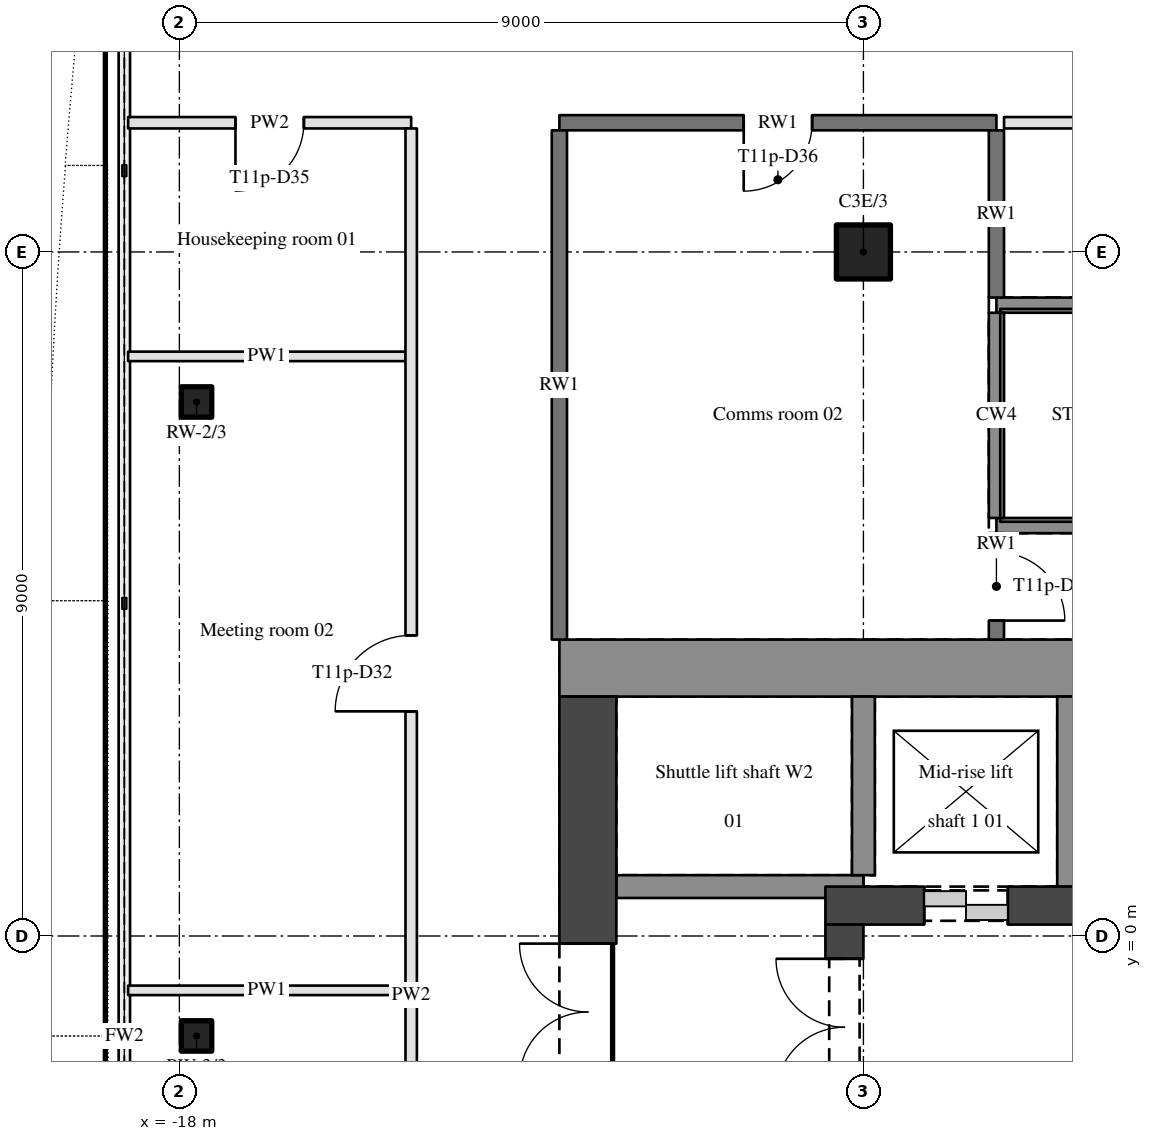
"""IFC4 building model, lengths in metres.
Left out: names, types, materials, properties, quantities, classifications, styles, units other than length and angle.
Written with IfcOpenShell. Run it as: python <this file> out.ifc"""

import sys

from ifc_helpers import new_model, si_unit, direction, frame, frame_2d, origin, origin_2d, place, context, subcontext, project, spatial, rectangle, hollow_rectangle, hollow_circle, extrude, element, fill, save


model = new_model("IFC4")
c1 = context("Model", 3, precision=1e-05, world=origin(), true_north=direction((0.0, 1.0)))
c2 = subcontext(c1, "Body", "Model", "MODEL_VIEW")
j1 = project(units=[si_unit("LENGTHUNIT", "METRE"), si_unit("PLANEANGLEUNIT", "RADIAN")], contexts=[c1])
p1 = place(None, origin())
s1 = spatial("IfcSite", under=j1, at=p1, CompositionType="ELEMENT")
p2 = place(p1, origin())
s2 = spatial("IfcBuilding", under=s1, at=p2, CompositionType="ELEMENT")
p3 = place(p2, frame((0.0, 0.0, 158.9)))
s3 = spatial("IfcBuildingStorey", under=s2, at=p3, CompositionType="ELEMENT", Elevation=158.9)
p4 = place(p3, frame((-9.0, 9.0, 0.0), z_axis=(0.0, 0.0, 1.0), x_axis=(1.0, 0.0, 0.0)))
e1 = element("IfcColumn", 1, at=p4, inside=s3, PredefinedType="COLUMN", context=c2, shape_type="SweptSolid", body=[
    extrude(hollow_circle(Radius=0.355, WallThickness=0.032, at=origin_2d()), origin(), (0.0, 0.0, 1.0), 3.4),
])
for number, where, z_axis, x_axis in (
    (2, (-17.774, 7.026, 0.0), (0.0, 0.0, 1.0), (1.0, 0.0, 0.0)),
    (3, (-17.774, -1.315, 0.0), (0.0, 0.0, 1.0), (1.0, 0.0, 0.0)),
):
    element("IfcColumn", number, at=place(p3, frame(where, z_axis=z_axis, x_axis=x_axis)), inside=s3, PredefinedType="COLUMN", context=c2, shape_type="SweptSolid", body=[
        extrude(hollow_rectangle(XDim=0.4, YDim=0.4, WallThickness=0.02, InnerFilletRadius=0.03, OuterFilletRadius=0.05, at=origin_2d()), origin(), (0.0, 0.0, 1.0), 3.4),
    ])
p5 = place(p3, frame((-13.0, 3.525, 0.0), z_axis=(0.0, 0.0, 1.0), x_axis=(1.0, 0.0, 0.0)))
e4 = element("IfcWall", 4, at=p5, inside=s3, PredefinedType="SHEAR", context=c2, shape_type="SweptSolid", body=[
    extrude(rectangle(XDim=26.0, YDim=0.75, at=frame_2d((13.0, 0.0))), origin(), (0.0, 0.0, 1.0), 3.4),
])
p6 = place(p3, frame((-12.625, -11.5, 0.0), z_axis=(0.0, 0.0, 1.0), x_axis=(0.0, 1.0, 0.0)))
e5 = element("IfcWall", 5, at=p6, inside=s3, PredefinedType="SHEAR", context=c2, shape_type="SweptSolid", body=[
    extrude(rectangle(XDim=14.65, YDim=0.75, at=frame_2d((7.325, 0.0))), origin(), (0.0, 0.0, 1.0), 3.4),
])
p7 = place(p6, frame((9.6, 0.0, 0.0)))
e6 = element("IfcOpeningElement", 6, at=p7, cuts=e5, PredefinedType="OPENING", context=c2, shape_type="SweptSolid", body=[
    extrude(rectangle(XDim=1.8, YDim=2.1, at=frame_2d((0.9, 1.05))), frame((0.0, 0.385, 0.0), z_axis=(0.0, -1.0, 0.0), x_axis=(1.0, 0.0, 0.0)), (0.0, 0.0, 1.0), 0.77),
])
p8 = place(p3, frame((-9.5, 0.4, 0.0), z_axis=(0.0, 0.0, 1.0), x_axis=(1.0, 0.0, 0.0)))
e7 = element("IfcWall", 7, at=p8, inside=s3, PredefinedType="SHEAR", context=c2, shape_type="SweptSolid", body=[
    extrude(rectangle(XDim=19.0, YDim=0.5, at=frame_2d((9.5, 0.0))), origin(), (0.0, 0.0, 1.0), 3.4),
])
p9 = place(p8, frame((1.3, 0.0, 0.0)))
e8 = element("IfcOpeningElement", 8, at=p9, cuts=e7, PredefinedType="OPENING", context=c2, shape_type="SweptSolid", body=[
    extrude(rectangle(XDim=1.1, YDim=2.1, at=frame_2d((0.55, 1.05))), frame((0.0, 0.26, 0.0), z_axis=(0.0, -1.0, 0.0), x_axis=(1.0, 0.0, 0.0)), (0.0, 0.0, 1.0), 0.52),
])
p10 = place(p8, frame((4.0, 0.0, 0.0)))
e9 = element("IfcOpeningElement", 9, at=p10, cuts=e7, PredefinedType="OPENING", context=c2, shape_type="SweptSolid", body=[
    extrude(rectangle(XDim=1.1, YDim=2.1, at=frame_2d((0.55, 1.05))), frame((0.0, 0.26, 0.0), z_axis=(0.0, -1.0, 0.0), x_axis=(1.0, 0.0, 0.0)), (0.0, 0.0, 1.0), 0.52),
])
p11 = place(p8, frame((6.7, 0.0, 0.0)))
e10 = element("IfcOpeningElement", 10, at=p11, cuts=e7, PredefinedType="OPENING", context=c2, shape_type="SweptSolid", body=[
    extrude(rectangle(XDim=1.1, YDim=2.1, at=frame_2d((0.55, 1.05))), frame((0.0, 0.26, 0.0), z_axis=(0.0, -1.0, 0.0), x_axis=(1.0, 0.0, 0.0)), (0.0, 0.0, 1.0), 0.52),
])
p12 = place(p8, frame((11.2, 0.0, 0.0)))
e11 = element("IfcOpeningElement", 11, at=p12, cuts=e7, PredefinedType="OPENING", context=c2, shape_type="SweptSolid", body=[
    extrude(rectangle(XDim=1.1, YDim=2.1, at=frame_2d((0.55, 1.05))), frame((0.0, 0.26, 0.0), z_axis=(0.0, -1.0, 0.0), x_axis=(1.0, 0.0, 0.0)), (0.0, 0.0, 1.0), 0.52),
])
p13 = place(p8, frame((13.9, 0.0, 0.0)))
e12 = element("IfcOpeningElement", 12, at=p13, cuts=e7, PredefinedType="OPENING", context=c2, shape_type="SweptSolid", body=[
    extrude(rectangle(XDim=1.1, YDim=2.1, at=frame_2d((0.55, 1.05))), frame((0.0, 0.26, 0.0), z_axis=(0.0, -1.0, 0.0), x_axis=(1.0, 0.0, 0.0)), (0.0, 0.0, 1.0), 0.52),
])
p14 = place(p8, frame((16.6, 0.0, 0.0)))
e13 = element("IfcOpeningElement", 13, at=p14, cuts=e7, PredefinedType="OPENING", context=c2, shape_type="SweptSolid", body=[
    extrude(rectangle(XDim=1.1, YDim=2.1, at=frame_2d((0.55, 1.05))), frame((0.0, 0.26, 0.0), z_axis=(0.0, -1.0, 0.0), x_axis=(1.0, 0.0, 0.0)), (0.0, 0.0, 1.0), 0.52),
])
p15 = place(p3, frame((-9.25, -11.5, 0.0), z_axis=(0.0, 0.0, 1.0), x_axis=(0.0, 1.0, 0.0)))
e14 = element("IfcWall", 14, at=p15, inside=s3, PredefinedType="SHEAR", context=c2, shape_type="SweptSolid", body=[
    extrude(rectangle(XDim=11.65, YDim=0.5, at=frame_2d((5.825, 0.0))), origin(), (0.0, 0.0, 1.0), 3.4),
])
p16 = place(p15, frame((9.4, 0.0, 0.0)))
e15 = element("IfcOpeningElement", 15, at=p16, cuts=e14, PredefinedType="OPENING", context=c2, shape_type="SweptSolid", body=[
    extrude(rectangle(XDim=1.8, YDim=2.1, at=frame_2d((0.9, 1.05))), frame((0.0, 0.26, 0.0), z_axis=(0.0, -1.0, 0.0), x_axis=(1.0, 0.0, 0.0)), (0.0, 0.0, 1.0), 0.52),
])
p17 = place(p15, frame((5.25, 0.0, 0.0)))
e16 = element("IfcOpeningElement", 16, at=p17, cuts=e14, PredefinedType="OPENING", context=c2, shape_type="SweptSolid", body=[
    extrude(rectangle(XDim=1.1, YDim=2.1, at=frame_2d((0.55, 1.05))), frame((0.0, 0.26, 0.0), z_axis=(0.0, -1.0, 0.0), x_axis=(1.0, 0.0, 0.0)), (0.0, 0.0, 1.0), 0.52),
])
p18 = place(p3, frame((-18.674, -0.715, 0.0), z_axis=(0.0, 0.0, 1.0), x_axis=(1.0, 0.0, 0.0)))
e17 = element("IfcWall", 17, at=p18, inside=s3, PredefinedType="PARTITIONING", context=c2, shape_type="SweptSolid", body=[
    extrude(rectangle(XDim=3.649, YDim=0.125, at=frame_2d((1.825, 0.0))), origin(), (0.0, 0.0, 1.0), 2.46),
])
p19 = place(p3, frame((-9.0, 0.65, 0.0), z_axis=(0.0, 0.0, 1.0), x_axis=(-1.0, 0.0, 0.0)))
e18 = element("IfcWall", 18, at=p19, inside=s3, PredefinedType="SHEAR", context=c2, shape_type="SweptSolid", body=[
    extrude(rectangle(XDim=3.25, YDim=0.3, at=frame_2d((1.625, 0.0))), origin(), (0.0, 0.0, 1.0), 3.4),
])
p20 = place(p3, frame((-7.25, 5.4, 0.0), z_axis=(0.0, 0.0, 1.0), x_axis=(1.0, 0.0, 0.0)))
e19 = element("IfcWall", 19, at=p20, inside=s3, PredefinedType="SHEAR", context=c2, shape_type="SweptSolid", body=[
    extrude(rectangle(XDim=6.6, YDim=0.2, at=frame_2d((3.3, 0.0))), origin(), (0.0, 0.0, 1.0), 3.4),
])
p21 = place(p3, frame((-18.674, 7.626, 0.0), z_axis=(0.0, 0.0, 1.0), x_axis=(1.0, 0.0, 0.0)))
e20 = element("IfcWall", 20, at=p21, inside=s3, PredefinedType="PARTITIONING", context=c2, shape_type="SweptSolid", body=[
    extrude(rectangle(XDim=3.649, YDim=0.125, at=frame_2d((1.825, 0.0))), origin(), (0.0, 0.0, 1.0), 2.46),
])
p22 = place(p3, frame((-0.65, 8.3, 0.0), z_axis=(0.0, 0.0, 1.0), x_axis=(-1.0, 0.0, 0.0)))
e21 = element("IfcWall", 21, at=p22, inside=s3, PredefinedType="SHEAR", context=c2, shape_type="SweptSolid", body=[
    extrude(rectangle(XDim=6.6, YDim=0.2, at=frame_2d((3.3, 0.0))), origin(), (0.0, 0.0, 1.0), 3.4),
])
p23 = place(p22, frame((0.2, 0.0, 0.0)))
e22 = element("IfcOpeningElement", 22, at=p23, cuts=e21, PredefinedType="OPENING", context=c2, shape_type="SweptSolid", body=[
    extrude(rectangle(XDim=1.1, YDim=2.1, at=frame_2d((0.55, 1.05))), frame((0.0, 0.11, 0.0), z_axis=(0.0, -1.0, 0.0), x_axis=(1.0, 0.0, 0.0)), (0.0, 0.0, 1.0), 0.22),
])
p24 = place(p3, frame((-14.95, 10.7, 0.0), z_axis=(0.0, 0.0, 1.0), x_axis=(-1.0, 0.0, 0.0)))
e23 = element("IfcWall", 23, at=p24, inside=s3, PredefinedType="PARTITIONING", context=c2, shape_type="SweptSolid", body=[
    extrude(rectangle(XDim=3.724, YDim=0.15, at=frame_2d((1.862, 0.0))), origin(), (0.0, 0.0, 1.0), 2.46),
])
p25 = place(p24, frame((1.412, 0.0, 0.0)))
e24 = element("IfcOpeningElement", 24, at=p25, cuts=e23, PredefinedType="OPENING", context=c2, shape_type="SweptSolid", body=[
    extrude(rectangle(XDim=0.9, YDim=2.1, at=frame_2d((0.45, 1.05))), frame((0.0, 0.085, 0.0), z_axis=(0.0, -1.0, 0.0), x_axis=(1.0, 0.0, 0.0)), (0.0, 0.0, 1.0), 0.17),
])
p26 = place(p3, frame((-7.25, 10.7, 0.0), z_axis=(0.0, 0.0, 1.0), x_axis=(-1.0, 0.0, 0.0)))
e25 = element("IfcWall", 25, at=p26, inside=s3, PredefinedType="SOLIDWALL", context=c2, shape_type="SweptSolid", body=[
    extrude(rectangle(XDim=5.75, YDim=0.2, at=frame_2d((2.875, 0.0))), origin(), (0.0, 0.0, 1.0), 2.46),
])
p27 = place(p26, frame((2.425, 0.0, 0.0)))
e26 = element("IfcOpeningElement", 26, at=p27, cuts=e25, PredefinedType="OPENING", context=c2, shape_type="SweptSolid", body=[
    extrude(rectangle(XDim=0.9, YDim=2.1, at=frame_2d((0.45, 1.05))), frame((0.0, 0.11, 0.0), z_axis=(0.0, -1.0, 0.0), x_axis=(1.0, 0.0, 0.0)), (0.0, 0.0, 1.0), 0.22),
])
p28 = place(p3, frame((16.05, 10.7, 0.0), z_axis=(0.0, 0.0, 1.0), x_axis=(-1.0, 0.0, 0.0)))
e27 = element("IfcWall", 27, at=p28, inside=s3, PredefinedType="PARTITIONING", context=c2, shape_type="SweptSolid", body=[
    extrude(rectangle(XDim=23.2, YDim=0.15, at=frame_2d((11.6, 0.0))), origin(), (0.0, 0.0, 1.0), 2.46),
])
p29 = place(p28, frame((19.125, 0.0, 0.0)))
e28 = element("IfcOpeningElement", 28, at=p29, cuts=e27, PredefinedType="OPENING", context=c2, shape_type="SweptSolid", body=[
    extrude(rectangle(XDim=1.0, YDim=2.1, at=frame_2d((0.5, 1.05))), frame((0.0, 0.085, 0.0), z_axis=(0.0, -1.0, 0.0), x_axis=(1.0, 0.0, 0.0)), (0.0, 0.0, 1.0), 0.17),
])
p30 = place(p28, frame((10.35, 0.0, 0.0)))
e29 = element("IfcOpeningElement", 29, at=p30, cuts=e27, PredefinedType="OPENING", context=c2, shape_type="SweptSolid", body=[
    extrude(rectangle(XDim=0.9, YDim=2.1, at=frame_2d((0.45, 1.05))), frame((0.0, 0.085, 0.0), z_axis=(0.0, -1.0, 0.0), x_axis=(1.0, 0.0, 0.0)), (0.0, 0.0, 1.0), 0.17),
])
p31 = place(p28, frame((3.85, 0.0, 0.0)))
e30 = element("IfcOpeningElement", 30, at=p31, cuts=e27, PredefinedType="OPENING", context=c2, shape_type="SweptSolid", body=[
    extrude(rectangle(XDim=0.9, YDim=2.1, at=frame_2d((0.45, 1.05))), frame((0.0, 0.085, 0.0), z_axis=(0.0, -1.0, 0.0), x_axis=(1.0, 0.0, 0.0)), (0.0, 0.0, 1.0), 0.17),
])
p32 = place(p28, frame((1.075, 0.0, 0.0)))
e31 = element("IfcOpeningElement", 31, at=p32, cuts=e27, PredefinedType="OPENING", context=c2, shape_type="SweptSolid", body=[
    extrude(rectangle(XDim=0.9, YDim=2.1, at=frame_2d((0.45, 1.05))), frame((0.0, 0.085, 0.0), z_axis=(0.0, -1.0, 0.0), x_axis=(1.0, 0.0, 0.0)), (0.0, 0.0, 1.0), 0.17),
])
p33 = place(p3, frame((-14.95, -12.175, 0.0), z_axis=(0.0, 0.0, 1.0), x_axis=(0.0, 1.0, 0.0)))
e32 = element("IfcWall", 32, at=p33, inside=s3, PredefinedType="PARTITIONING", context=c2, shape_type="SweptSolid", body=[
    extrude(rectangle(XDim=22.8, YDim=0.15, at=frame_2d((11.4, 0.0))), origin(), (0.0, 0.0, 1.0), 2.46),
])
p34 = place(p33, frame((6.789, 0.0, 0.0)))
e33 = element("IfcOpeningElement", 33, at=p34, cuts=e32, PredefinedType="OPENING", context=c2, shape_type="SweptSolid", body=[
    extrude(rectangle(XDim=1.0, YDim=2.1, at=frame_2d((0.5, 1.05))), frame((0.0, 0.085, 0.0), z_axis=(0.0, -1.0, 0.0), x_axis=(1.0, 0.0, 0.0)), (0.0, 0.0, 1.0), 0.17),
])
p35 = place(p33, frame((15.131, 0.0, 0.0)))
e34 = element("IfcOpeningElement", 34, at=p35, cuts=e32, PredefinedType="OPENING", context=c2, shape_type="SweptSolid", body=[
    extrude(rectangle(XDim=1.0, YDim=2.1, at=frame_2d((0.5, 1.05))), frame((0.0, 0.085, 0.0), z_axis=(0.0, -1.0, 0.0), x_axis=(1.0, 0.0, 0.0)), (0.0, 0.0, 1.0), 0.17),
])
p36 = place(p3, frame((-13.0, 3.9, 0.0), z_axis=(0.0, 0.0, 1.0), x_axis=(0.0, 1.0, 0.0)))
e35 = element("IfcWall", 35, at=p36, inside=s3, PredefinedType="SOLIDWALL", context=c2, shape_type="SweptSolid", body=[
    extrude(rectangle(XDim=6.7, YDim=0.2, at=frame_2d((3.35, 0.0))), origin(), (0.0, 0.0, 1.0), 2.46),
])
p37 = place(p3, frame((-9.0, 0.8, 0.0), z_axis=(0.0, 0.0, 1.0), x_axis=(0.0, 1.0, 0.0)))
e36 = element("IfcWall", 36, at=p37, inside=s3, PredefinedType="SHEAR", context=c2, shape_type="SweptSolid", body=[
    extrude(rectangle(XDim=2.35, YDim=0.3, at=frame_2d((1.175, 0.0))), origin(), (0.0, 0.0, 1.0), 3.4),
])
p38 = place(p3, frame((-7.25, 5.3, 0.0), z_axis=(0.0, 0.0, 1.0), x_axis=(0.0, -1.0, 0.0)))
e37 = element("IfcWall", 37, at=p38, inside=s3, PredefinedType="SOLIDWALL", context=c2, shape_type="SweptSolid", body=[
    extrude(rectangle(XDim=1.4, YDim=0.2, at=frame_2d((0.7, 0.0))), origin(), (0.0, 0.0, 1.0), 2.46),
])
p39 = place(p38, frame((0.25, 0.0, 0.0)))
e38 = element("IfcOpeningElement", 38, at=p39, cuts=e37, PredefinedType="OPENING", context=c2, shape_type="SweptSolid", body=[
    extrude(rectangle(XDim=0.9, YDim=2.1, at=frame_2d((0.45, 1.05))), frame((0.0, 0.11, 0.0), z_axis=(0.0, -1.0, 0.0), x_axis=(1.0, 0.0, 0.0)), (0.0, 0.0, 1.0), 0.22),
])
p40 = place(p3, frame((-7.25, 5.5, 0.0), z_axis=(0.0, 0.0, 1.0), x_axis=(0.0, 1.0, 0.0)))
e39 = element("IfcWall", 39, at=p40, inside=s3, PredefinedType="SHEAR", context=c2, shape_type="SweptSolid", body=[
    extrude(rectangle(XDim=2.7, YDim=0.2, at=frame_2d((1.35, 0.0))), origin(), (0.0, 0.0, 1.0), 3.4),
])
p41 = place(p3, frame((-7.25, 8.4, 0.0), z_axis=(0.0, 0.0, 1.0), x_axis=(0.0, 1.0, 0.0)))
e40 = element("IfcWall", 40, at=p41, inside=s3, PredefinedType="SOLIDWALL", context=c2, shape_type="SweptSolid", body=[
    extrude(rectangle(XDim=2.2, YDim=0.2, at=frame_2d((1.1, 0.0))), origin(), (0.0, 0.0, 1.0), 2.46),
])
p42 = place(p3, frame((-6.3, 0.65, 0.0), z_axis=(0.0, 0.0, 1.0), x_axis=(0.0, 1.0, 0.0)))
e41 = element("IfcWall", 41, at=p42, inside=s3, PredefinedType="SHEAR", context=c2, shape_type="SweptSolid", body=[
    extrude(rectangle(XDim=2.5, YDim=0.3, at=frame_2d((1.25, 0.0))), origin(), (0.0, 0.0, 1.0), 3.4),
])
p43 = place(p7, origin())
e42 = element("IfcDoor", 42, at=p43, inside=s3, OperationType="DOUBLE_DOOR_SINGLE_SWING", PredefinedType="DOOR", context=c2, shape_type="SweptSolid", body=[
    extrude(rectangle(XDim=1.8, YDim=2.1, at=frame_2d((0.9, 1.05))), frame((0.0, 0.025, 0.0), z_axis=(0.0, -1.0, 0.0), x_axis=(1.0, 0.0, 0.0)), (0.0, 0.0, 1.0), 0.05),
])
fill(e6, e42)
p44 = place(p16, origin())
e43 = element("IfcDoor", 43, at=p44, inside=s3, OperationType="DOUBLE_DOOR_SINGLE_SWING", PredefinedType="DOOR", context=c2, shape_type="SweptSolid", body=[
    extrude(rectangle(XDim=1.8, YDim=2.1, at=frame_2d((0.9, 1.05))), frame((0.0, 0.025, 0.0), z_axis=(0.0, -1.0, 0.0), x_axis=(1.0, 0.0, 0.0)), (0.0, 0.0, 1.0), 0.05),
])
fill(e15, e43)
p45 = place(p39, origin())
e44 = element("IfcDoor", 44, at=p45, inside=s3, OperationType="SINGLE_SWING_RIGHT", PredefinedType="DOOR", context=c2, shape_type="SweptSolid", body=[
    extrude(rectangle(XDim=0.9, YDim=2.1, at=frame_2d((0.45, 1.05))), frame((0.0, 0.025, 0.0), z_axis=(0.0, -1.0, 0.0), x_axis=(1.0, 0.0, 0.0)), (0.0, 0.0, 1.0), 0.05),
])
fill(e38, e44)
p46 = place(p27, origin())
e45 = element("IfcDoor", 45, at=p46, inside=s3, OperationType="SINGLE_SWING_RIGHT", PredefinedType="DOOR", context=c2, shape_type="SweptSolid", body=[
    extrude(rectangle(XDim=0.9, YDim=2.1, at=frame_2d((0.45, 1.05))), frame((0.0, 0.025, 0.0), z_axis=(0.0, -1.0, 0.0), x_axis=(1.0, 0.0, 0.0)), (0.0, 0.0, 1.0), 0.05),
])
fill(e26, e45)
p47 = place(p35, origin())
e46 = element("IfcDoor", 46, at=p47, inside=s3, OperationType="SINGLE_SWING_LEFT", PredefinedType="DOOR", context=c2, shape_type="SweptSolid", body=[
    extrude(rectangle(XDim=1.0, YDim=2.1, at=frame_2d((0.5, 1.05))), frame((0.0, 0.025, 0.0), z_axis=(0.0, -1.0, 0.0), x_axis=(1.0, 0.0, 0.0)), (0.0, 0.0, 1.0), 0.05),
])
fill(e34, e46)
p48 = place(p25, origin())
e47 = element("IfcDoor", 47, at=p48, inside=s3, OperationType="SINGLE_SWING_RIGHT", PredefinedType="DOOR", context=c2, shape_type="SweptSolid", body=[
    extrude(rectangle(XDim=0.9, YDim=2.1, at=frame_2d((0.45, 1.05))), frame((0.0, 0.025, 0.0), z_axis=(0.0, -1.0, 0.0), x_axis=(1.0, 0.0, 0.0)), (0.0, 0.0, 1.0), 0.05),
])
fill(e24, e47)
p49 = place(p9, origin())
e48 = element("IfcDoor", 48, at=p49, inside=s3, OperationType="DOUBLE_DOOR_SLIDING", PredefinedType="DOOR", context=c2, shape_type="SweptSolid", body=[
    extrude(rectangle(XDim=1.1, YDim=2.1, at=frame_2d((0.55, 1.05))), frame((0.0, 0.025, 0.0), z_axis=(0.0, -1.0, 0.0), x_axis=(1.0, 0.0, 0.0)), (0.0, 0.0, 1.0), 0.05),
])
fill(e8, e48)
save(model, sys.argv[1])
